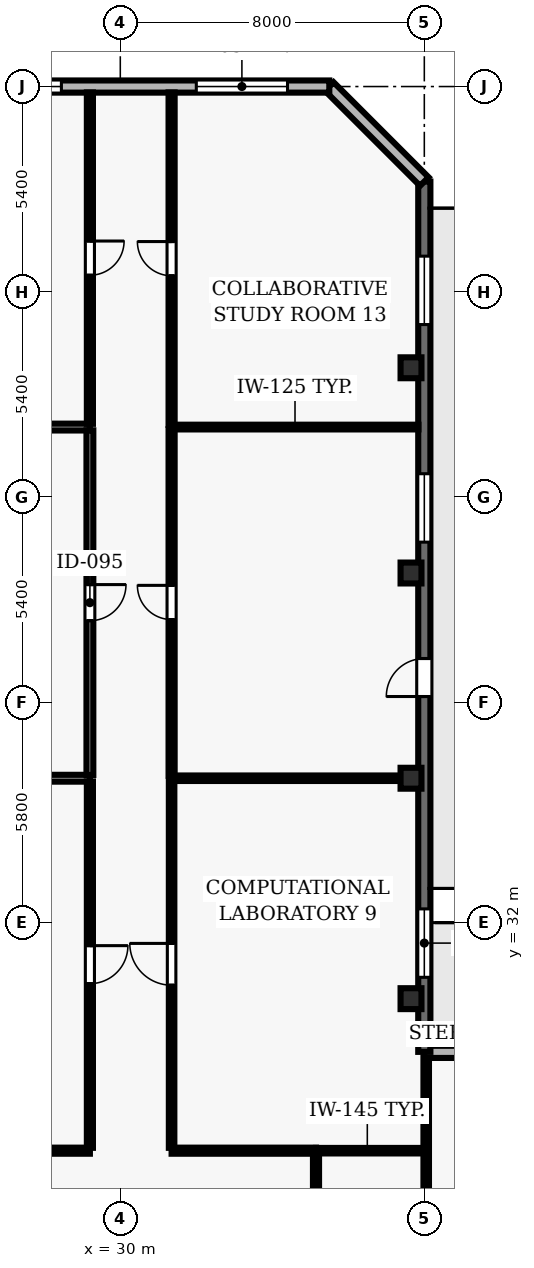
"""IFC4 building model, lengths in metres.
Left out: names, types, materials, properties, quantities, classifications, styles, units other than length and angle.
Written with IfcOpenShell. Run it as: python <this file> out.ifc"""

import sys

from ifc_helpers import new_model, si_unit, direction, frame, frame_2d, origin, origin_2d, place, context, subcontext, project, spatial, rectangle, hollow_rectangle, extrude, element, fill, save


model = new_model("IFC4")
c1 = context("Model", 3, precision=1e-05, world=origin(), true_north=direction((0.0, 1.0)))
c2 = subcontext(c1, "Body", "Model", "MODEL_VIEW")
j1 = project(units=[si_unit("LENGTHUNIT", "METRE"), si_unit("PLANEANGLEUNIT", "RADIAN")], contexts=[c1])
p1 = place(None, origin())
s1 = spatial("IfcSite", under=j1, at=p1, CompositionType="ELEMENT")
p2 = place(p1, origin())
s2 = spatial("IfcBuilding", under=s1, at=p2, CompositionType="ELEMENT")
p3 = place(p2, frame((0.0, 0.0, 31.0)))
s3 = spatial("IfcBuildingStorey", under=s2, at=p3, CompositionType="ELEMENT", Elevation=31.0)
for number, where, z_axis, x_axis in (
    (1, (37.65, 30.0, 0.0), (0.0, 0.0, 1.0), (1.0, 0.0, 0.0)),
    (2, (37.65, 35.8, 0.0), (0.0, 0.0, 1.0), (1.0, 0.0, 0.0)),
    (3, (37.65, 41.2, 0.0), (0.0, 0.0, 1.0), (1.0, 0.0, 0.0)),
    (4, (37.65, 46.6, 0.0), (0.0, 0.0, 1.0), (1.0, 0.0, 0.0)),
):
    element("IfcColumn", number, at=place(p3, frame(where, z_axis=z_axis, x_axis=x_axis)), inside=s3, PredefinedType="COLUMN", context=c2, shape_type="SweptSolid", body=[
        extrude(hollow_rectangle(XDim=0.55, YDim=0.55, WallThickness=0.025, at=origin_2d()), origin(), (0.0, 0.0, 1.0), 3.9),
    ])
p4 = place(p3, frame((54.3, 28.6, 0.0), z_axis=(0.0, 0.0, 1.0), x_axis=(-1.0, 0.0, 0.0)))
e5 = element("IfcWall", 5, at=p4, inside=s3, PredefinedType="SOLIDWALL", context=c2, shape_type="SweptSolid", body=[
    extrude(rectangle(XDim=16.3, YDim=0.32, at=frame_2d((8.15, 0.0))), origin(), (0.0, 0.0, 1.0), 3.69),
])
p5 = place(p4, frame((7.7, 0.0, 0.0)))
e6 = element("IfcOpeningElement", 6, at=p5, cuts=e5, PredefinedType="OPENING", context=c2, shape_type="SweptSolid", body=[
    extrude(rectangle(XDim=1.35, YDim=2.2, at=frame_2d((0.675, 1.1))), frame((0.0, 0.17, 0.0), z_axis=(0.0, -1.0, 0.0), x_axis=(1.0, 0.0, 0.0)), (0.0, 0.0, 1.0), 0.34),
])
p6 = place(p4, frame((1.967, 0.0, 0.9)))
e7 = element("IfcOpeningElement", 7, at=p6, cuts=e5, PredefinedType="OPENING", context=c2, shape_type="SweptSolid", body=[
    extrude(rectangle(XDim=1.5, YDim=1.6, at=frame_2d((0.75, 0.8))), frame((0.0, 0.17, 0.0), z_axis=(0.0, -1.0, 0.0), x_axis=(1.0, 0.0, 0.0)), (0.0, 0.0, 1.0), 0.34),
])
p7 = place(p4, frame((12.833, 0.0, 0.9)))
e8 = element("IfcOpeningElement", 8, at=p7, cuts=e5, PredefinedType="OPENING", context=c2, shape_type="SweptSolid", body=[
    extrude(rectangle(XDim=1.5, YDim=1.6, at=frame_2d((0.75, 0.8))), frame((0.0, 0.17, 0.0), z_axis=(0.0, -1.0, 0.0), x_axis=(1.0, 0.0, 0.0)), (0.0, 0.0, 1.0), 0.34),
])
p8 = place(p3, frame((38.0, 28.6, 0.0), z_axis=(0.0, 0.0, 1.0), x_axis=(0.0, 1.0, 0.0)))
e9 = element("IfcWall", 9, at=p8, inside=s3, PredefinedType="SOLIDWALL", context=c2, shape_type="SweptSolid", body=[
    extrude(rectangle(XDim=22.9, YDim=0.32, at=frame_2d((11.45, 0.0))), origin(), (0.0, 0.0, 1.0), 3.69),
])
p9 = place(p8, frame((9.35, 0.0, 0.0)))
e10 = element("IfcOpeningElement", 10, at=p9, cuts=e9, PredefinedType="OPENING", context=c2, shape_type="SweptSolid", body=[
    extrude(rectangle(XDim=1.0, YDim=2.2, at=frame_2d((0.5, 1.1))), frame((0.0, 0.17, 0.0), z_axis=(0.0, -1.0, 0.0), x_axis=(1.0, 0.0, 0.0)), (0.0, 0.0, 1.0), 0.34),
])
p10 = place(p8, frame((1.962, 0.0, 0.9)))
e11 = element("IfcOpeningElement", 11, at=p10, cuts=e9, PredefinedType="OPENING", context=c2, shape_type="SweptSolid", body=[
    extrude(rectangle(XDim=1.8, YDim=1.6, at=frame_2d((0.9, 0.8))), frame((0.0, 0.17, 0.0), z_axis=(0.0, -1.0, 0.0), x_axis=(1.0, 0.0, 0.0)), (0.0, 0.0, 1.0), 0.34),
])
p11 = place(p8, frame((13.412, 0.0, 0.9)))
e12 = element("IfcOpeningElement", 12, at=p11, cuts=e9, PredefinedType="OPENING", context=c2, shape_type="SweptSolid", body=[
    extrude(rectangle(XDim=1.8, YDim=1.6, at=frame_2d((0.9, 0.8))), frame((0.0, 0.17, 0.0), z_axis=(0.0, -1.0, 0.0), x_axis=(1.0, 0.0, 0.0)), (0.0, 0.0, 1.0), 0.34),
])
p12 = place(p8, frame((19.137, 0.0, 0.9)))
e13 = element("IfcOpeningElement", 13, at=p12, cuts=e9, PredefinedType="OPENING", context=c2, shape_type="SweptSolid", body=[
    extrude(rectangle(XDim=1.8, YDim=1.6, at=frame_2d((0.9, 0.8))), frame((0.0, 0.17, 0.0), z_axis=(0.0, -1.0, 0.0), x_axis=(1.0, 0.0, 0.0)), (0.0, 0.0, 1.0), 0.34),
])
p13 = place(p3, frame((38.0, 51.5, 0.0), z_axis=(0.0, 0.0, 1.0), x_axis=(-0.707106781187, 0.707106781187, 0.0)))
e14 = element("IfcWall", 14, at=p13, inside=s3, PredefinedType="SOLIDWALL", context=c2, shape_type="SweptSolid", body=[
    extrude(rectangle(XDim=3.536, YDim=0.32, at=frame_2d((1.768, 0.0))), origin(), (0.0, 0.0, 1.0), 3.69),
])
p14 = place(p3, frame((35.5, 54.0, 0.0), z_axis=(0.0, 0.0, 1.0), x_axis=(-1.0, 0.0, 0.0)))
e15 = element("IfcWall", 15, at=p14, inside=s3, PredefinedType="SOLIDWALL", context=c2, shape_type="SweptSolid", body=[
    extrude(rectangle(XDim=11.0, YDim=0.32, at=frame_2d((5.5, 0.0))), origin(), (0.0, 0.0, 1.0), 3.69),
])
p15 = place(p14, frame((1.1, 0.0, 0.9)))
e16 = element("IfcOpeningElement", 16, at=p15, cuts=e15, PredefinedType="OPENING", context=c2, shape_type="SweptSolid", body=[
    extrude(rectangle(XDim=2.4, YDim=1.6, at=frame_2d((1.2, 0.8))), frame((0.0, 0.17, 0.0), z_axis=(0.0, -1.0, 0.0), x_axis=(1.0, 0.0, 0.0)), (0.0, 0.0, 1.0), 0.34),
])
p16 = place(p14, frame((7.05, 0.0, 0.9)))
e17 = element("IfcOpeningElement", 17, at=p16, cuts=e15, PredefinedType="OPENING", context=c2, shape_type="SweptSolid", body=[
    extrude(rectangle(XDim=2.4, YDim=1.6, at=frame_2d((1.2, 0.8))), frame((0.0, 0.17, 0.0), z_axis=(0.0, -1.0, 0.0), x_axis=(1.0, 0.0, 0.0)), (0.0, 0.0, 1.0), 0.34),
])
p17 = place(p3, frame((29.2, 26.0, 0.0), z_axis=(0.0, 0.0, 1.0), x_axis=(-1.0, 0.0, 0.0)))
e18 = element("IfcWall", 18, at=p17, inside=s3, PredefinedType="PARTITIONING", context=c2, shape_type="SweptSolid", body=[
    extrude(rectangle(XDim=7.045, YDim=0.16, at=frame_2d((3.522, 0.0))), origin(), (0.0, 0.0, 1.0), 3.69),
])
p18 = place(p3, frame((29.2, 35.8, 0.0), z_axis=(0.0, 0.0, 1.0), x_axis=(-1.0, 0.0, 0.0)))
e19 = element("IfcWall", 19, at=p18, inside=s3, PredefinedType="PARTITIONING", context=c2, shape_type="SweptSolid", body=[
    extrude(rectangle(XDim=7.045, YDim=0.18, at=frame_2d((3.522, 0.0))), origin(), (0.0, 0.0, 1.0), 2.995),
])
p19 = place(p3, frame((29.2, 45.04, 0.0), z_axis=(0.0, 0.0, 1.0), x_axis=(-1.0, 0.0, 0.0)))
e20 = element("IfcWall", 20, at=p19, inside=s3, PredefinedType="PARTITIONING", context=c2, shape_type="SweptSolid", body=[
    extrude(rectangle(XDim=7.045, YDim=0.18, at=frame_2d((3.522, 0.0))), origin(), (0.0, 0.0, 1.0), 3.69),
])
p20 = place(p3, frame((35.15, 26.0, 0.0), z_axis=(0.0, 0.0, 1.0), x_axis=(-1.0, 0.0, 0.0)))
e21 = element("IfcWall", 21, at=p20, inside=s3, PredefinedType="PARTITIONING", context=c2, shape_type="SweptSolid", body=[
    extrude(rectangle(XDim=3.8, YDim=0.16, at=frame_2d((1.9, 0.0))), origin(), (0.0, 0.0, 1.0), 3.69),
])
p21 = place(p3, frame((35.15, 26.0, 0.0), z_axis=(0.0, 0.0, 1.0), x_axis=(1.0, 0.0, 0.0)))
e22 = element("IfcWall", 22, at=p21, inside=s3, PredefinedType="PARTITIONING", context=c2, shape_type="SweptSolid", body=[
    extrude(rectangle(XDim=2.7, YDim=0.145, at=frame_2d((1.35, 0.0))), origin(), (0.0, 0.0, 1.0), 3.69),
])
p22 = place(p3, frame((37.845, 35.8, 0.0), z_axis=(0.0, 0.0, 1.0), x_axis=(-1.0, 0.0, 0.0)))
e23 = element("IfcWall", 23, at=p22, inside=s3, PredefinedType="PARTITIONING", context=c2, shape_type="SweptSolid", body=[
    extrude(rectangle(XDim=6.495, YDim=0.145, at=frame_2d((3.248, 0.0))), origin(), (0.0, 0.0, 1.0), 2.995),
])
p23 = place(p3, frame((37.845, 45.04, 0.0), z_axis=(0.0, 0.0, 1.0), x_axis=(-1.0, 0.0, 0.0)))
e24 = element("IfcWall", 24, at=p23, inside=s3, PredefinedType="PARTITIONING", context=c2, shape_type="SweptSolid", body=[
    extrude(rectangle(XDim=6.495, YDim=0.125, at=frame_2d((3.248, 0.0))), origin(), (0.0, 0.0, 1.0), 3.69),
])
p24 = place(p3, frame((29.2, 35.715, 0.0), z_axis=(0.0, 0.0, 1.0), x_axis=(0.0, -1.0, 0.0)))
e25 = element("IfcWall", 25, at=p24, inside=s3, PredefinedType="PARTITIONING", context=c2, shape_type="SweptSolid", body=[
    extrude(rectangle(XDim=9.64, YDim=0.16, at=frame_2d((4.82, 0.0))), origin(), (0.0, 0.0, 1.0), 3.69),
])
p25 = place(p24, frame((4.32, 0.0, 0.0)))
e26 = element("IfcOpeningElement", 26, at=p25, cuts=e25, PredefinedType="OPENING", context=c2, shape_type="SweptSolid", body=[
    extrude(rectangle(XDim=1.0, YDim=2.1, at=frame_2d((0.5, 1.05))), frame((0.0, 0.09, 0.0), z_axis=(0.0, -1.0, 0.0), x_axis=(1.0, 0.0, 0.0)), (0.0, 0.0, 1.0), 0.18),
])
p26 = place(p3, frame((29.2, 44.955, 0.0), z_axis=(0.0, 0.0, 1.0), x_axis=(0.0, -1.0, 0.0)))
e27 = element("IfcWall", 27, at=p26, inside=s3, PredefinedType="PARTITIONING", context=c2, shape_type="SweptSolid", body=[
    extrude(rectangle(XDim=9.07, YDim=0.18, at=frame_2d((4.535, 0.0))), origin(), (0.0, 0.0, 1.0), 3.69),
])
p27 = place(p26, frame((4.06, 0.0, 0.0)))
e28 = element("IfcOpeningElement", 28, at=p27, cuts=e27, PredefinedType="OPENING", context=c2, shape_type="SweptSolid", body=[
    extrude(rectangle(XDim=0.95, YDim=2.1, at=frame_2d((0.475, 1.05))), frame((0.0, 0.1, 0.0), z_axis=(0.0, -1.0, 0.0), x_axis=(1.0, 0.0, 0.0)), (0.0, 0.0, 1.0), 0.2),
])
p28 = place(p3, frame((29.2, 53.845, 0.0), z_axis=(0.0, 0.0, 1.0), x_axis=(0.0, -1.0, 0.0)))
e29 = element("IfcWall", 29, at=p28, inside=s3, PredefinedType="PARTITIONING", context=c2, shape_type="SweptSolid", body=[
    extrude(rectangle(XDim=8.72, YDim=0.16, at=frame_2d((4.36, 0.0))), origin(), (0.0, 0.0, 1.0), 3.69),
])
p29 = place(p28, frame((3.91, 0.0, 0.0)))
e30 = element("IfcOpeningElement", 30, at=p29, cuts=e29, PredefinedType="OPENING", context=c2, shape_type="SweptSolid", body=[
    extrude(rectangle(XDim=0.9, YDim=2.1, at=frame_2d((0.45, 1.05))), frame((0.0, 0.09, 0.0), z_axis=(0.0, -1.0, 0.0), x_axis=(1.0, 0.0, 0.0)), (0.0, 0.0, 1.0), 0.18),
])
p30 = place(p3, frame((31.35, 26.075, 0.0), z_axis=(0.0, 0.0, 1.0), x_axis=(0.0, 1.0, 0.0)))
e31 = element("IfcWall", 31, at=p30, inside=s3, PredefinedType="PARTITIONING", context=c2, shape_type="SweptSolid", body=[
    extrude(rectangle(XDim=9.657, YDim=0.145, at=frame_2d((4.829, 0.0))), origin(), (0.0, 0.0, 1.0), 3.69),
])
p31 = place(p30, frame((4.279, 0.0, 0.0)))
e32 = element("IfcOpeningElement", 32, at=p31, cuts=e31, PredefinedType="OPENING", context=c2, shape_type="SweptSolid", body=[
    extrude(rectangle(XDim=1.1, YDim=2.15, at=frame_2d((0.55, 1.075))), frame((0.0, 0.083, 0.0), z_axis=(0.0, -1.0, 0.0), x_axis=(1.0, 0.0, 0.0)), (0.0, 0.0, 1.0), 0.165),
])
p32 = place(p3, frame((31.35, 35.867, 0.0), z_axis=(0.0, 0.0, 1.0), x_axis=(0.0, 1.0, 0.0)))
e33 = element("IfcWall", 33, at=p32, inside=s3, PredefinedType="PARTITIONING", context=c2, shape_type="SweptSolid", body=[
    extrude(rectangle(XDim=9.116, YDim=0.16, at=frame_2d((4.558, 0.0))), origin(), (0.0, 0.0, 1.0), 3.69),
])
p33 = place(p32, frame((4.108, 0.0, 0.0)))
e34 = element("IfcOpeningElement", 34, at=p33, cuts=e33, PredefinedType="OPENING", context=c2, shape_type="SweptSolid", body=[
    extrude(rectangle(XDim=0.9, YDim=2.1, at=frame_2d((0.45, 1.05))), frame((0.0, 0.09, 0.0), z_axis=(0.0, -1.0, 0.0), x_axis=(1.0, 0.0, 0.0)), (0.0, 0.0, 1.0), 0.18),
])
p34 = place(p3, frame((31.35, 45.097, 0.0), z_axis=(0.0, 0.0, 1.0), x_axis=(0.0, 1.0, 0.0)))
e35 = element("IfcWall", 35, at=p34, inside=s3, PredefinedType="PARTITIONING", context=c2, shape_type="SweptSolid", body=[
    extrude(rectangle(XDim=8.748, YDim=0.16, at=frame_2d((4.374, 0.0))), origin(), (0.0, 0.0, 1.0), 3.69),
])
p35 = place(p34, frame((3.924, 0.0, 0.0)))
e36 = element("IfcOpeningElement", 36, at=p35, cuts=e35, PredefinedType="OPENING", context=c2, shape_type="SweptSolid", body=[
    extrude(rectangle(XDim=0.9, YDim=2.1, at=frame_2d((0.45, 1.05))), frame((0.0, 0.09, 0.0), z_axis=(0.0, -1.0, 0.0), x_axis=(1.0, 0.0, 0.0)), (0.0, 0.0, 1.0), 0.18),
])
p36 = place(p3, frame((35.15, 24.07, 0.0), z_axis=(0.0, 0.0, 1.0), x_axis=(0.0, 1.0, 0.0)))
e37 = element("IfcWall", 37, at=p36, inside=s3, PredefinedType="PARTITIONING", context=c2, shape_type="SweptSolid", body=[
    extrude(rectangle(XDim=1.855, YDim=0.16, at=frame_2d((0.927, 0.0))), origin(), (0.0, 0.0, 1.0), 3.69),
])
p37 = place(p3, frame((38.05, 28.445, 0.0), z_axis=(0.0, 0.0, 1.0), x_axis=(0.0, -1.0, 0.0)))
e38 = element("IfcWall", 38, at=p37, inside=s3, PredefinedType="PARTITIONING", context=c2, shape_type="SweptSolid", body=[
    extrude(rectangle(XDim=4.395, YDim=0.145, at=frame_2d((2.198, 0.0))), origin(), (0.0, 0.0, 1.0), 2.995),
])
p38 = place(p9, origin())
e39 = element("IfcDoor", 39, at=p38, inside=s3, OperationType="SINGLE_SWING_LEFT", PredefinedType="DOOR", context=c2, shape_type="SweptSolid", body=[
    extrude(rectangle(XDim=1.0, YDim=2.2, at=frame_2d((0.5, 1.1))), frame((0.0, 0.025, 0.0), z_axis=(0.0, -1.0, 0.0), x_axis=(1.0, 0.0, 0.0)), (0.0, 0.0, 1.0), 0.05),
])
fill(e10, e39)
p39 = place(p10, origin())
e40 = element("IfcWindow", 40, at=p39, inside=s3, PartitioningType="SINGLE_PANEL", PredefinedType="WINDOW", context=c2, shape_type="SweptSolid", body=[
    extrude(rectangle(XDim=1.8, YDim=1.6, at=frame_2d((0.9, 0.8))), frame((0.0, 0.03, 0.0), z_axis=(0.0, -1.0, 0.0), x_axis=(1.0, 0.0, 0.0)), (0.0, 0.0, 1.0), 0.06),
])
fill(e11, e40)
p40 = place(p11, origin())
e41 = element("IfcWindow", 41, at=p40, inside=s3, PartitioningType="SINGLE_PANEL", PredefinedType="WINDOW", context=c2, shape_type="SweptSolid", body=[
    extrude(rectangle(XDim=1.8, YDim=1.6, at=frame_2d((0.9, 0.8))), frame((0.0, 0.03, 0.0), z_axis=(0.0, -1.0, 0.0), x_axis=(1.0, 0.0, 0.0)), (0.0, 0.0, 1.0), 0.06),
])
fill(e12, e41)
p41 = place(p12, origin())
e42 = element("IfcWindow", 42, at=p41, inside=s3, PartitioningType="SINGLE_PANEL", PredefinedType="WINDOW", context=c2, shape_type="SweptSolid", body=[
    extrude(rectangle(XDim=1.8, YDim=1.6, at=frame_2d((0.9, 0.8))), frame((0.0, 0.03, 0.0), z_axis=(0.0, -1.0, 0.0), x_axis=(1.0, 0.0, 0.0)), (0.0, 0.0, 1.0), 0.06),
])
fill(e13, e42)
p42 = place(p15, origin())
e43 = element("IfcWindow", 43, at=p42, inside=s3, PartitioningType="SINGLE_PANEL", PredefinedType="WINDOW", context=c2, shape_type="SweptSolid", body=[
    extrude(rectangle(XDim=2.4, YDim=1.6, at=frame_2d((1.2, 0.8))), frame((0.0, 0.03, 0.0), z_axis=(0.0, -1.0, 0.0), x_axis=(1.0, 0.0, 0.0)), (0.0, 0.0, 1.0), 0.06),
])
fill(e16, e43)
p43 = place(p16, origin())
e44 = element("IfcWindow", 44, at=p43, inside=s3, PartitioningType="SINGLE_PANEL", PredefinedType="WINDOW", context=c2, shape_type="SweptSolid", body=[
    extrude(rectangle(XDim=2.4, YDim=1.6, at=frame_2d((1.2, 0.8))), frame((0.0, 0.03, 0.0), z_axis=(0.0, -1.0, 0.0), x_axis=(1.0, 0.0, 0.0)), (0.0, 0.0, 1.0), 0.06),
])
fill(e17, e44)
p44 = place(p25, origin())
e45 = element("IfcDoor", 45, at=p44, inside=s3, OperationType="SINGLE_SWING_LEFT", PredefinedType="DOOR", context=c2, shape_type="SweptSolid", body=[
    extrude(rectangle(XDim=1.0, YDim=2.1, at=frame_2d((0.5, 1.05))), frame((0.0, 0.025, 0.0), z_axis=(0.0, -1.0, 0.0), x_axis=(1.0, 0.0, 0.0)), (0.0, 0.0, 1.0), 0.05),
])
fill(e26, e45)
p45 = place(p31, origin())
e46 = element("IfcDoor", 46, at=p45, inside=s3, OperationType="SINGLE_SWING_RIGHT", PredefinedType="DOOR", context=c2, shape_type="SweptSolid", body=[
    extrude(rectangle(XDim=1.1, YDim=2.15, at=frame_2d((0.55, 1.075))), frame((0.0, 0.025, 0.0), z_axis=(0.0, -1.0, 0.0), x_axis=(1.0, 0.0, 0.0)), (0.0, 0.0, 1.0), 0.05),
])
fill(e32, e46)
p46 = place(p27, origin())
e47 = element("IfcDoor", 47, at=p46, inside=s3, OperationType="SINGLE_SWING_LEFT", PredefinedType="DOOR", context=c2, shape_type="SweptSolid", body=[
    extrude(rectangle(XDim=0.95, YDim=2.1, at=frame_2d((0.475, 1.05))), frame((0.0, 0.025, 0.0), z_axis=(0.0, -1.0, 0.0), x_axis=(1.0, 0.0, 0.0)), (0.0, 0.0, 1.0), 0.05),
])
fill(e28, e47)
p47 = place(p33, origin())
e48 = element("IfcDoor", 48, at=p47, inside=s3, OperationType="SINGLE_SWING_RIGHT", PredefinedType="DOOR", context=c2, shape_type="SweptSolid", body=[
    extrude(rectangle(XDim=0.9, YDim=2.1, at=frame_2d((0.45, 1.05))), frame((0.0, 0.025, 0.0), z_axis=(0.0, -1.0, 0.0), x_axis=(1.0, 0.0, 0.0)), (0.0, 0.0, 1.0), 0.05),
])
fill(e34, e48)
p48 = place(p29, origin())
e49 = element("IfcDoor", 49, at=p48, inside=s3, OperationType="SINGLE_SWING_LEFT", PredefinedType="DOOR", context=c2, shape_type="SweptSolid", body=[
    extrude(rectangle(XDim=0.9, YDim=2.1, at=frame_2d((0.45, 1.05))), frame((0.0, 0.025, 0.0), z_axis=(0.0, -1.0, 0.0), x_axis=(1.0, 0.0, 0.0)), (0.0, 0.0, 1.0), 0.05),
])
fill(e30, e49)
p49 = place(p35, origin())
e50 = element("IfcDoor", 50, at=p49, inside=s3, OperationType="SINGLE_SWING_RIGHT", PredefinedType="DOOR", context=c2, shape_type="SweptSolid", body=[
    extrude(rectangle(XDim=0.9, YDim=2.1, at=frame_2d((0.45, 1.05))), frame((0.0, 0.025, 0.0), z_axis=(0.0, -1.0, 0.0), x_axis=(1.0, 0.0, 0.0)), (0.0, 0.0, 1.0), 0.05),
])
fill(e36, e50)
save(model, sys.argv[1])
